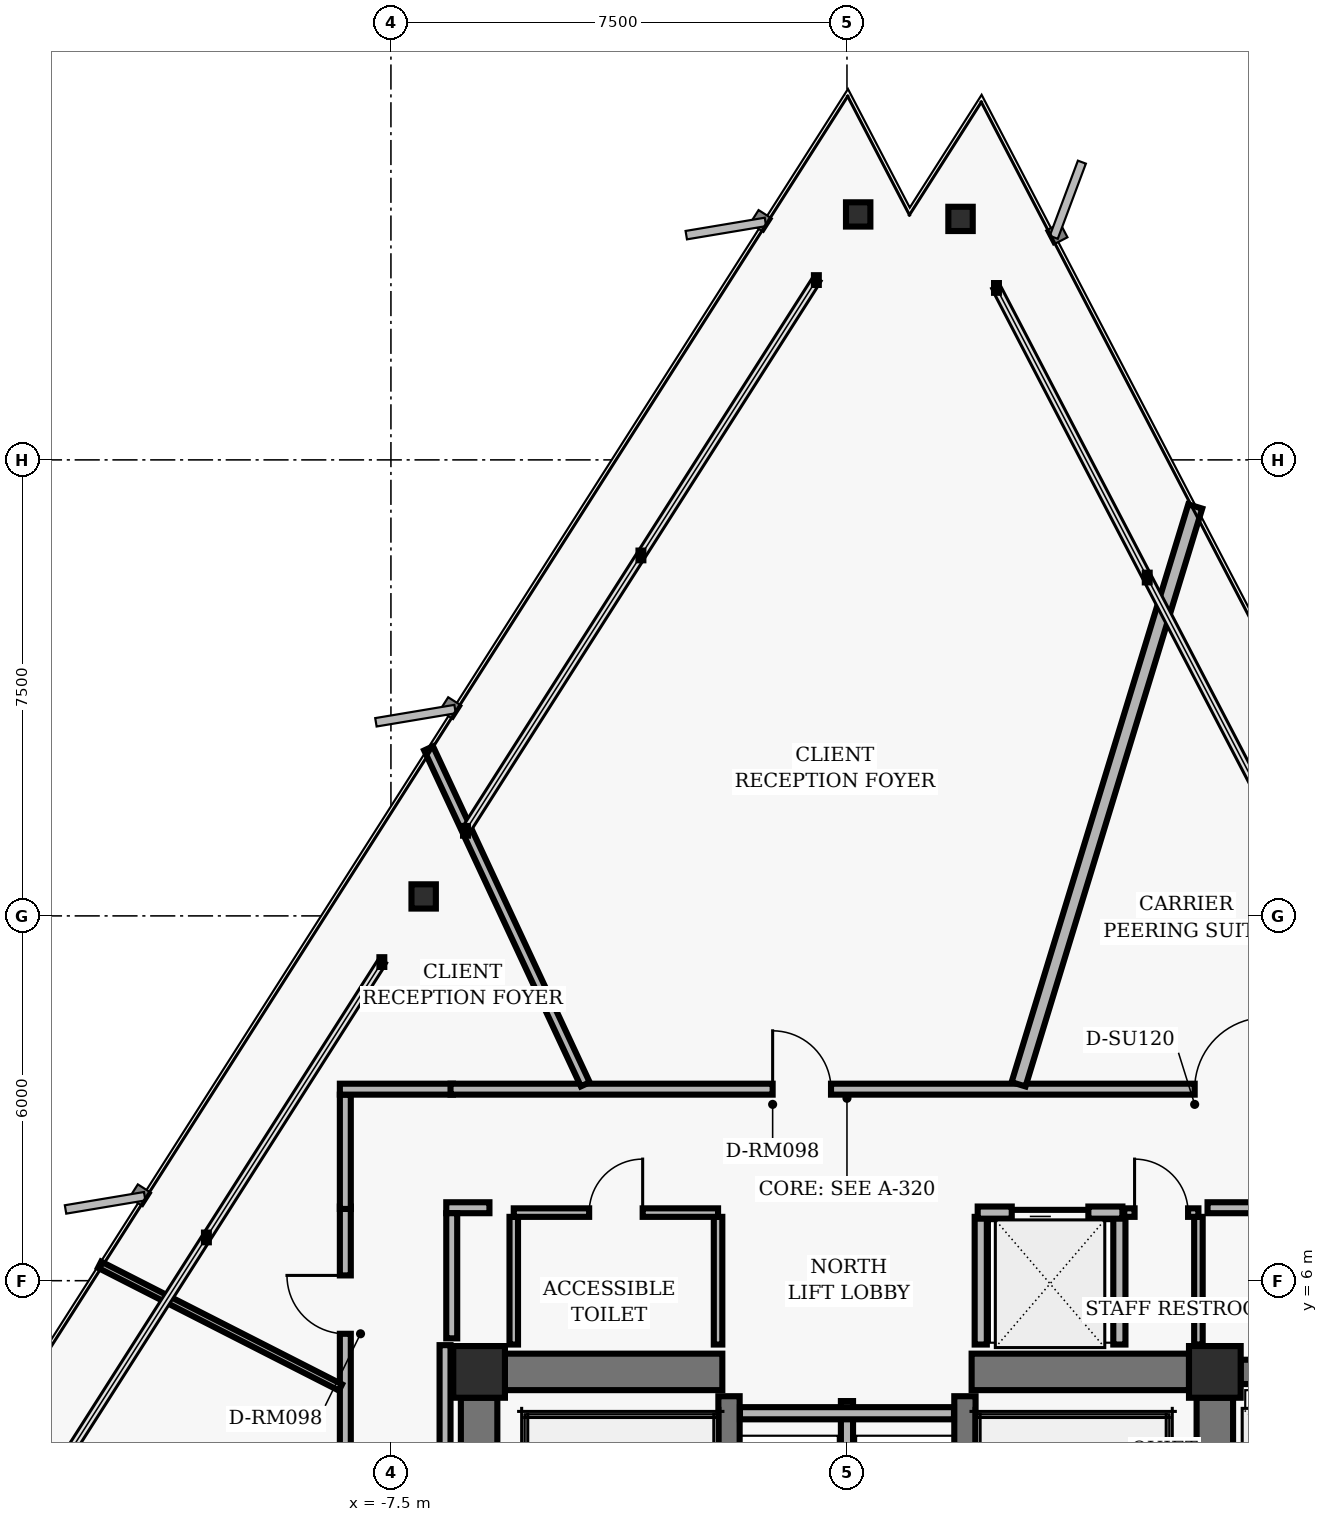
"""IFC4 building model, lengths in metres.
Left out: names, types, materials, properties, quantities, classifications, styles, units other than length and angle.
Written with IfcOpenShell. Run it as: python <this file> out.ifc"""

import sys

from ifc_helpers import new_model, si_unit, direction, frame, frame_2d, origin, origin_2d, place, context, subcontext, project, spatial, rectangle, hollow_rectangle, i_section, extrude, element, fill, save


model = new_model("IFC4")
c1 = context("Model", 3, precision=1e-05, world=origin(), true_north=direction((0.0, 1.0)))
c2 = subcontext(c1, "Body", "Model", "MODEL_VIEW")
j1 = project(units=[si_unit("LENGTHUNIT", "METRE"), si_unit("PLANEANGLEUNIT", "RADIAN")], contexts=[c1])
p1 = place(None, origin())
s1 = spatial("IfcSite", under=j1, at=p1, CompositionType="ELEMENT")
p2 = place(p1, origin())
s2 = spatial("IfcBuilding", under=s1, at=p2, CompositionType="ELEMENT")
p3 = place(p2, frame((0.0, 0.0, 141.12)))
s3 = spatial("IfcBuildingStorey", under=s2, at=p3, CompositionType="ELEMENT", Elevation=141.12)
for number, where, z_axis, x_axis in (
    (1, (-6.05, 4.5, 0.0), (0.0, 0.0, 1.0), (1.0, 0.0, 0.0)),
    (2, (6.05, 4.5, 0.0), (0.0, 0.0, 1.0), (1.0, 0.0, 0.0)),
):
    element("IfcColumn", number, at=place(p3, frame(where, z_axis=z_axis, x_axis=x_axis)), inside=s3, PredefinedType="COLUMN", context=c2, shape_type="SweptSolid", body=[
        extrude(hollow_rectangle(XDim=0.85, YDim=0.85, WallThickness=0.055, InnerFilletRadius=0.02, OuterFilletRadius=0.04, at=origin_2d()), origin(), (0.0, 0.0, 1.0), 3.04),
    ])
for number, where, z_axis, x_axis in (
    (3, (-6.05, 0.425, 0.0), (0.0, 0.0, 1.0), (0.0, 1.0, 0.0)),
    (4, (6.05, 0.425, 0.0), (0.0, 0.0, 1.0), (0.0, 1.0, 0.0)),
):
    element("IfcWall", number, at=place(p3, frame(where, z_axis=z_axis, x_axis=x_axis)), inside=s3, PredefinedType="SHEAR", context=c2, shape_type="SweptSolid", body=[
        extrude(rectangle(XDim=3.65, YDim=0.6, at=frame_2d((1.825, 0.0))), origin(), (0.0, 0.0, 1.0), 2.788),
    ])
for number, where, z_axis, x_axis in (
    (5, (-1.94, -4.1, 0.0), (0.0, 0.0, 1.0), (0.0, 1.0, 0.0)),
    (6, (1.94, -4.1, 0.0), (0.0, 0.0, 1.0), (0.0, 1.0, 0.0)),
):
    element("IfcWall", number, at=place(p3, frame(where, z_axis=z_axis, x_axis=x_axis)), inside=s3, PredefinedType="SHEAR", context=c2, shape_type="SweptSolid", body=[
        extrude(rectangle(XDim=8.2, YDim=0.35, at=frame_2d((4.1, 0.0))), origin(), (0.0, 0.0, 1.0), 2.788),
    ])
for number, where, z_axis, x_axis in (
    (7, (-5.625, 4.5, 0.0), (0.0, 0.0, 1.0), (1.0, 0.0, 0.0)),
    (8, (2.05, 4.5, 0.0), (0.0, 0.0, 1.0), (1.0, 0.0, 0.0)),
):
    element("IfcWall", number, at=place(p3, frame(where, z_axis=z_axis, x_axis=x_axis)), inside=s3, PredefinedType="SHEAR", context=c2, shape_type="SweptSolid", body=[
        extrude(rectangle(XDim=3.575, YDim=0.6, at=frame_2d((1.788, 0.0))), origin(), (0.0, 0.0, 1.0), 2.788),
    ])
p4 = place(p3, frame((6.475, 4.5, 0.0), z_axis=(0.0, 0.0, 1.0), x_axis=(1.0, 0.0, 0.0)))
e9 = element("IfcWall", 9, at=p4, inside=s3, PredefinedType="SHEAR", context=c2, shape_type="SweptSolid", body=[
    extrude(rectangle(XDim=2.05, YDim=0.4, at=frame_2d((1.025, 0.0))), origin(), (0.0, 0.0, 1.0), 2.788),
])
for number, where, z_axis, x_axis in (
    (10, (1.868, 23.463, 0.0), (0.0, 0.0, 1.0), (1.0, 0.0, 0.0)),
    (11, (0.184, 23.537, 0.0), (0.0, 0.0, 1.0), (1.0, 0.0, 0.0)),
    (12, (-6.962, 12.32, 0.0), (0.0, 0.0, 1.0), (1.0, 0.0, 0.0)),
):
    element("IfcColumn", number, at=place(p3, frame(where, z_axis=z_axis, x_axis=x_axis)), inside=s3, PredefinedType="COLUMN", context=c2, shape_type="SweptSolid", body=[
        extrude(i_section(OverallWidth=0.401, OverallDepth=0.399, WebThickness=0.025, FlangeThickness=0.04, FilletRadius=0.018, at=origin_2d()), origin(), (0.0, 0.0, 1.0), 3.04),
    ])
p5 = place(p3, frame((0.0, 1.25, 0.0), z_axis=(0.0, 0.0, 1.0), x_axis=(0.0, 1.0, 0.0)))
e13 = element("IfcWall", 13, at=p5, inside=s3, PredefinedType="PARTITIONING", context=c2, shape_type="SweptSolid", body=[
    extrude(rectangle(XDim=2.77, YDim=0.2, at=frame_2d((1.385, 0.0))), origin(), (0.0, 0.0, 1.0), 2.763),
])
p6 = place(p3, frame((-1.76, 3.82, 0.0), z_axis=(0.0, 0.0, 1.0), x_axis=(1.0, 0.0, 0.0)))
e14 = element("IfcWall", 14, at=p6, inside=s3, PredefinedType="PARTITIONING", context=c2, shape_type="SweptSolid", body=[
    extrude(rectangle(XDim=3.52, YDim=0.2, at=frame_2d((1.76, 0.0))), origin(), (0.0, 0.0, 1.0), 2.763),
])
for number, where, z_axis, x_axis in (
    (15, (2.2, 4.95, 0.0), (0.0, 0.0, 1.0), (0.0, 1.0, 0.0)),
    (16, (4.48, 4.95, 0.0), (0.0, 0.0, 1.0), (0.0, 1.0, 0.0)),
):
    element("IfcWall", number, at=place(p3, frame(where, z_axis=z_axis, x_axis=x_axis)), inside=s3, PredefinedType="PARTITIONING", context=c2, shape_type="SweptSolid", body=[
        extrude(rectangle(XDim=2.1, YDim=0.2, at=frame_2d((1.05, 0.0))), origin(), (0.0, 0.0, 1.0), 2.763),
    ])
p7 = place(p3, frame((2.15, 7.12, 0.0), z_axis=(0.0, 0.0, 1.0), x_axis=(1.0, 0.0, 0.0)))
e17 = element("IfcWall", 17, at=p7, inside=s3, PredefinedType="PARTITIONING", context=c2, shape_type="SweptSolid", body=[
    extrude(rectangle(XDim=2.38, YDim=0.2, at=frame_2d((1.19, 0.0))), origin(), (0.0, 0.0, 1.0), 2.763),
])
p8 = place(p7, frame((0.56, 0.0, 0.0)))
e18 = element("IfcOpeningElement", 18, at=p8, cuts=e17, PredefinedType="OPENING", context=c2, shape_type="SweptSolid", body=[
    extrude(rectangle(XDim=1.26, YDim=2.06, at=frame_2d((0.63, 1.03))), frame((0.0, 0.11, 0.0), z_axis=(0.0, -1.0, 0.0), x_axis=(1.0, 0.0, 0.0)), (0.0, 0.0, 1.0), 0.22),
])
for number, where, z_axis, x_axis in (
    (19, (-5.48, 4.95, 0.0), (0.0, 0.0, 1.0), (0.0, 1.0, 0.0)),
    (20, (-2.12, 4.95, 0.0), (0.0, 0.0, 1.0), (0.0, 1.0, 0.0)),
):
    element("IfcWall", number, at=place(p3, frame(where, z_axis=z_axis, x_axis=x_axis)), inside=s3, PredefinedType="PARTITIONING", context=c2, shape_type="SweptSolid", body=[
        extrude(rectangle(XDim=2.1, YDim=0.14, at=frame_2d((1.05, 0.0))), origin(), (0.0, 0.0, 1.0), 2.763),
    ])
p9 = place(p3, frame((-5.48, 7.12, 0.0), z_axis=(0.0, 0.0, 1.0), x_axis=(1.0, 0.0, 0.0)))
e21 = element("IfcWall", 21, at=p9, inside=s3, PredefinedType="PARTITIONING", context=c2, shape_type="SweptSolid", body=[
    extrude(rectangle(XDim=3.36, YDim=0.14, at=frame_2d((1.68, 0.0))), origin(), (0.0, 0.0, 1.0), 2.33),
])
p10 = place(p9, frame((1.24, 0.0, 0.0)))
e22 = element("IfcOpeningElement", 22, at=p10, cuts=e21, PredefinedType="OPENING", context=c2, shape_type="SweptSolid", body=[
    extrude(rectangle(XDim=0.88, YDim=2.02, at=frame_2d((0.44, 1.01))), frame((0.0, 0.08, 0.0), z_axis=(0.0, -1.0, 0.0), x_axis=(1.0, 0.0, 0.0)), (0.0, 0.0, 1.0), 0.16),
])
p11 = place(p3, frame((5.78, 4.95, 0.0), z_axis=(0.0, 0.0, 1.0), x_axis=(0.0, 1.0, 0.0)))
e23 = element("IfcWall", 23, at=p11, inside=s3, PredefinedType="PARTITIONING", context=c2, shape_type="SweptSolid", body=[
    extrude(rectangle(XDim=2.1, YDim=0.14, at=frame_2d((1.05, 0.0))), origin(), (0.0, 0.0, 1.0), 2.763),
])
p12 = place(p3, frame((4.56, 7.12, 0.0), z_axis=(0.0, 0.0, 1.0), x_axis=(1.0, 0.0, 0.0)))
e24 = element("IfcWall", 24, at=p12, inside=s3, PredefinedType="PARTITIONING", context=c2, shape_type="SweptSolid", body=[
    extrude(rectangle(XDim=1.22, YDim=0.14, at=frame_2d((0.61, 0.0))), origin(), (0.0, 0.0, 1.0), 2.763),
])
p13 = place(p12, frame((0.17, 0.0, 0.0)))
e25 = element("IfcOpeningElement", 25, at=p13, cuts=e24, PredefinedType="OPENING", context=c2, shape_type="SweptSolid", body=[
    extrude(rectangle(XDim=0.88, YDim=2.02, at=frame_2d((0.44, 1.01))), frame((0.0, 0.08, 0.0), z_axis=(0.0, -1.0, 0.0), x_axis=(1.0, 0.0, 0.0)), (0.0, 0.0, 1.0), 0.16),
])
p14 = place(p3, frame((-8.25, -7.22, 0.0), z_axis=(0.0, 0.0, 1.0), x_axis=(0.0, 1.0, 0.0)))
e26 = element("IfcWall", 26, at=p14, inside=s3, PredefinedType="PARTITIONING", context=c2, shape_type="SweptSolid", body=[
    extrude(rectangle(XDim=14.44, YDim=0.18, at=frame_2d((7.22, 0.0))), origin(), (0.0, 0.0, 1.0), 2.763),
])
p15 = place(p14, frame((6.154, 0.0, 0.0)))
e27 = element("IfcOpeningElement", 27, at=p15, cuts=e26, PredefinedType="OPENING", context=c2, shape_type="SweptSolid", body=[
    extrude(rectangle(XDim=0.96, YDim=2.02, at=frame_2d((0.48, 1.01))), frame((0.0, 0.1, 0.0), z_axis=(0.0, -1.0, 0.0), x_axis=(1.0, 0.0, 0.0)), (0.0, 0.0, 1.0), 0.2),
])
p16 = place(p14, frame((2.6, 0.0, 0.0)))
e28 = element("IfcOpeningElement", 28, at=p16, cuts=e26, PredefinedType="OPENING", context=c2, shape_type="SweptSolid", body=[
    extrude(rectangle(XDim=0.96, YDim=2.02, at=frame_2d((0.48, 1.01))), frame((0.0, 0.1, 0.0), z_axis=(0.0, -1.0, 0.0), x_axis=(1.0, 0.0, 0.0)), (0.0, 0.0, 1.0), 0.2),
])
p17 = place(p14, frame((12.347, 0.0, 0.0)))
e29 = element("IfcOpeningElement", 29, at=p17, cuts=e26, PredefinedType="OPENING", context=c2, shape_type="SweptSolid", body=[
    extrude(rectangle(XDim=0.96, YDim=2.02, at=frame_2d((0.48, 1.01))), frame((0.0, 0.1, 0.0), z_axis=(0.0, -1.0, 0.0), x_axis=(1.0, 0.0, 0.0)), (0.0, 0.0, 1.0), 0.2),
])
p18 = place(p14, frame((8.936, 0.0, 0.0)))
e30 = element("IfcOpeningElement", 30, at=p18, cuts=e26, PredefinedType="OPENING", context=c2, shape_type="SweptSolid", body=[
    extrude(rectangle(XDim=0.96, YDim=2.02, at=frame_2d((0.48, 1.01))), frame((0.0, 0.1, 0.0), z_axis=(0.0, -1.0, 0.0), x_axis=(1.0, 0.0, 0.0)), (0.0, 0.0, 1.0), 0.2),
])
p19 = place(p3, frame((-8.25, 7.18, 0.0), z_axis=(0.0, 0.0, 1.0), x_axis=(0.0, 1.0, 0.0)))
e31 = element("IfcWall", 31, at=p19, inside=s3, PredefinedType="PARTITIONING", context=c2, shape_type="SweptSolid", body=[
    extrude(rectangle(XDim=1.88, YDim=0.18, at=frame_2d((0.94, 0.0))), origin(), (0.0, 0.0, 1.0), 2.763),
])
p20 = place(p3, frame((-8.34, 9.15, 0.0), z_axis=(0.0, 0.0, 1.0), x_axis=(1.0, 0.0, 0.0)))
e32 = element("IfcWall", 32, at=p20, inside=s3, PredefinedType="PARTITIONING", context=c2, shape_type="SweptSolid", body=[
    extrude(rectangle(XDim=1.86, YDim=0.18, at=frame_2d((0.93, 0.0))), origin(), (0.0, 0.0, 1.0), 2.763),
])
p21 = place(p3, frame((-6.52, 9.15, 0.0), z_axis=(0.0, 0.0, 1.0), x_axis=(1.0, 0.0, 0.0)))
e33 = element("IfcWall", 33, at=p21, inside=s3, PredefinedType="PARTITIONING", context=c2, shape_type="SweptSolid", body=[
    extrude(rectangle(XDim=16.572, YDim=0.18, at=frame_2d((8.286, 0.0))), origin(), (0.0, 0.0, 1.0), 2.33),
])
p22 = place(p21, frame((12.238, 0.0, 0.0)))
e34 = element("IfcOpeningElement", 34, at=p22, cuts=e33, PredefinedType="OPENING", context=c2, shape_type="SweptSolid", body=[
    extrude(rectangle(XDim=1.18, YDim=2.02, at=frame_2d((0.59, 1.01))), frame((0.0, 0.1, 0.0), z_axis=(0.0, -1.0, 0.0), x_axis=(1.0, 0.0, 0.0)), (0.0, 0.0, 1.0), 0.2),
])
p23 = place(p21, frame((5.298, 0.0, 0.0)))
e35 = element("IfcOpeningElement", 35, at=p23, cuts=e33, PredefinedType="OPENING", context=c2, shape_type="SweptSolid", body=[
    extrude(rectangle(XDim=0.96, YDim=2.02, at=frame_2d((0.48, 1.01))), frame((0.0, 0.1, 0.0), z_axis=(0.0, -1.0, 0.0), x_axis=(1.0, 0.0, 0.0)), (0.0, 0.0, 1.0), 0.2),
])
p24 = place(p3, frame((11.05, 7.2, 0.0), z_axis=(0.0, 0.0, 1.0), x_axis=(-1.0, 0.0, 0.0)))
e36 = element("IfcWall", 36, at=p24, inside=s3, PredefinedType="PARTITIONING", context=c2, shape_type="SweptSolid", body=[
    extrude(rectangle(XDim=5.12, YDim=0.18, at=frame_2d((2.56, 0.0))), origin(), (0.0, 0.0, 1.0), 2.763),
])
p25 = place(p24, frame((2.08, 0.0, 0.0)))
e37 = element("IfcOpeningElement", 37, at=p25, cuts=e36, PredefinedType="OPENING", context=c2, shape_type="SweptSolid", body=[
    extrude(rectangle(XDim=0.96, YDim=2.02, at=frame_2d((0.48, 1.01))), frame((0.0, 0.1, 0.0), z_axis=(0.0, -1.0, 0.0), x_axis=(1.0, 0.0, 0.0)), (0.0, 0.0, 1.0), 0.2),
])
p26 = place(p3, frame((-5.88, 7.2, 0.0), z_axis=(0.0, 0.0, 1.0), x_axis=(-1.0, 0.0, 0.0)))
e38 = element("IfcWall", 38, at=p26, inside=s3, PredefinedType="PARTITIONING", context=c2, shape_type="SweptSolid", body=[
    extrude(rectangle(XDim=0.71, YDim=0.18, at=frame_2d((0.355, 0.0))), origin(), (0.0, 0.0, 1.0), 2.33),
])
p27 = place(p3, frame((-6.5, 7.11, 0.0), z_axis=(0.0, 0.0, 1.0), x_axis=(0.0, -1.0, 0.0)))
e39 = element("IfcWall", 39, at=p27, inside=s3, PredefinedType="PARTITIONING", context=c2, shape_type="SweptSolid", body=[
    extrude(rectangle(XDim=2.058, YDim=0.18, at=frame_2d((1.029, 0.0))), origin(), (0.0, 0.0, 1.0), 2.132),
])
p28 = place(p3, frame((-6.61, 4.94, 0.0), z_axis=(0.0, 0.0, 1.0), x_axis=(0.0, -1.0, 0.0)))
e40 = element("IfcWall", 40, at=p28, inside=s3, PredefinedType="PARTITIONING", context=c2, shape_type="SweptSolid", body=[
    extrude(rectangle(XDim=9.46, YDim=0.18, at=frame_2d((4.73, 0.0))), origin(), (0.0, 0.0, 1.0), 2.763),
])
p29 = place(p3, frame((2.822, 9.23, 0.0), z_axis=(0.0, 0.0, 1.0), x_axis=(0.292353963616, 0.956310179784, 0.0)))
e41 = element("IfcWall", 41, at=p29, inside=s3, PredefinedType="PARTITIONING", context=c2, shape_type="SweptSolid", body=[
    extrude(rectangle(XDim=9.938, YDim=0.24, at=frame_2d((4.969, 0.0))), origin(), (0.0, 0.0, 1.0), 2.763),
])
p30 = place(p3, frame((-4.304, 9.23, 0.0), z_axis=(0.0, 0.0, 1.0), x_axis=(-0.422635533016, 0.906299733108, 0.0)))
e42 = element("IfcWall", 42, at=p30, inside=s3, PredefinedType="PARTITIONING", context=c2, shape_type="SweptSolid", body=[
    extrude(rectangle(XDim=6.097, YDim=0.16, at=frame_2d((3.048, 0.0))), origin(), (0.0, 0.0, 1.0), 2.763),
])
p31 = place(p3, frame((-8.33, 4.244, 0.0), z_axis=(0.0, 0.0, 1.0), x_axis=(-0.890996324909, 0.454010516397, 0.0)))
e43 = element("IfcWall", 43, at=p31, inside=s3, PredefinedType="MOVABLE", context=c2, shape_type="SweptSolid", body=[
    extrude(rectangle(XDim=4.446, YDim=0.115, at=frame_2d((2.223, 0.0))), origin(), (0.0, 0.0, 1.0), 2.763),
])
p32 = place(p8, origin())
e44 = element("IfcDoor", 44, at=p32, inside=s3, OperationType="SLIDING_TO_LEFT", PredefinedType="DOOR", context=c2, shape_type="SweptSolid", body=[
    extrude(rectangle(XDim=1.26, YDim=2.06, at=frame_2d((0.63, 1.03))), frame((0.0, 0.025, 0.0), z_axis=(0.0, -1.0, 0.0), x_axis=(1.0, 0.0, 0.0)), (0.0, 0.0, 1.0), 0.05),
])
fill(e18, e44)
p33 = place(p10, origin())
e45 = element("IfcDoor", 45, at=p33, inside=s3, OperationType="SINGLE_SWING_RIGHT", PredefinedType="DOOR", context=c2, shape_type="SweptSolid", body=[
    extrude(rectangle(XDim=0.88, YDim=2.02, at=frame_2d((0.44, 1.01))), frame((0.0, 0.025, 0.0), z_axis=(0.0, -1.0, 0.0), x_axis=(1.0, 0.0, 0.0)), (0.0, 0.0, 1.0), 0.05),
])
fill(e22, e45)
p34 = place(p13, origin())
e46 = element("IfcDoor", 46, at=p34, inside=s3, OperationType="SINGLE_SWING_LEFT", PredefinedType="DOOR", context=c2, shape_type="SweptSolid", body=[
    extrude(rectangle(XDim=0.88, YDim=2.02, at=frame_2d((0.44, 1.01))), frame((0.0, 0.025, 0.0), z_axis=(0.0, -1.0, 0.0), x_axis=(1.0, 0.0, 0.0)), (0.0, 0.0, 1.0), 0.05),
])
fill(e25, e46)
p35 = place(p22, origin())
e47 = element("IfcDoor", 47, at=p35, inside=s3, OperationType="SINGLE_SWING_RIGHT", PredefinedType="DOOR", context=c2, shape_type="SweptSolid", body=[
    extrude(rectangle(XDim=1.18, YDim=2.02, at=frame_2d((0.59, 1.01))), frame((0.0, 0.025, 0.0), z_axis=(0.0, -1.0, 0.0), x_axis=(1.0, 0.0, 0.0)), (0.0, 0.0, 1.0), 0.05),
])
fill(e34, e47)
p36 = place(p23, origin())
e48 = element("IfcDoor", 48, at=p36, inside=s3, OperationType="SINGLE_SWING_LEFT", PredefinedType="DOOR", context=c2, shape_type="SweptSolid", body=[
    extrude(rectangle(XDim=0.96, YDim=2.02, at=frame_2d((0.48, 1.01))), frame((0.0, 0.025, 0.0), z_axis=(0.0, -1.0, 0.0), x_axis=(1.0, 0.0, 0.0)), (0.0, 0.0, 1.0), 0.05),
])
fill(e35, e48)
p37 = place(p17, origin())
e49 = element("IfcDoor", 49, at=p37, inside=s3, OperationType="SINGLE_SWING_RIGHT", PredefinedType="DOOR", context=c2, shape_type="SweptSolid", body=[
    extrude(rectangle(XDim=0.96, YDim=2.02, at=frame_2d((0.48, 1.01))), frame((0.0, 0.025, 0.0), z_axis=(0.0, -1.0, 0.0), x_axis=(1.0, 0.0, 0.0)), (0.0, 0.0, 1.0), 0.05),
])
fill(e29, e49)
save(model, sys.argv[1])
